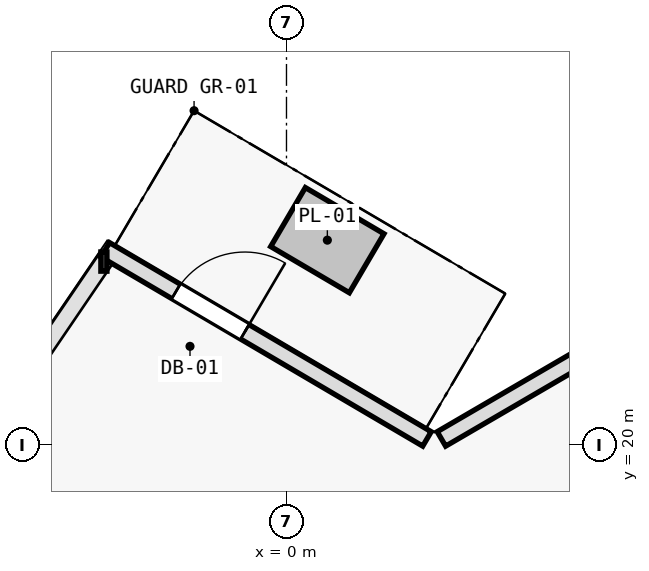
"""IFC4 building model, lengths in metres.
Left out: names, types, materials, properties, quantities, classifications, styles, units other than length and angle.
Written with IfcOpenShell. Run it as: python <this file> out.ifc"""

import sys

from ifc_helpers import new_model, si_unit, direction, frame, frame_2d, origin, place, context, subcontext, project, spatial, rectangle, extrude, element, fill, save


model = new_model("IFC4")
c1 = context("Model", 3, precision=1e-05, world=origin(), true_north=direction((0.0, 1.0)))
c2 = subcontext(c1, "Body", "Model", "MODEL_VIEW")
j1 = project(units=[si_unit("LENGTHUNIT", "METRE"), si_unit("PLANEANGLEUNIT", "RADIAN")], contexts=[c1])
p1 = place(None, origin())
s1 = spatial("IfcSite", under=j1, at=p1, CompositionType="ELEMENT")
p2 = place(p1, origin())
s2 = spatial("IfcBuilding", under=s1, at=p2, CompositionType="ELEMENT")
p3 = place(p2, frame((0.0, 0.0, 134.1)))
s3 = spatial("IfcBuildingStorey", under=s2, at=p3, CompositionType="ELEMENT", Elevation=134.1)
p4 = place(p3, frame((2.039, 20.079, 0.0), z_axis=(0.0, 0.0, 1.0), x_axis=(0.86398603623, 0.503515768571, 0.0)))
e1 = element("IfcWall", 1, at=p4, inside=s3, PredefinedType="SOLIDWALL", context=c2, shape_type="SweptSolid", body=[
    extrude(rectangle(XDim=4.444, YDim=0.22, at=frame_2d((2.222, 0.0))), origin(), (0.0, 0.0, 1.0), 4.25),
])
p5 = place(p3, frame((-2.385, 22.567, 0.0), z_axis=(0.0, 0.0, 1.0), x_axis=(0.8621258938, -0.506694131839, 0.0)))
e2 = element("IfcWall", 2, at=p5, inside=s3, PredefinedType="SOLIDWALL", context=c2, shape_type="SweptSolid", body=[
    extrude(rectangle(XDim=4.91, YDim=0.22, at=frame_2d((2.455, 0.0))), origin(), (0.0, 0.0, 1.0), 4.25),
])
p6 = place(p5, frame((1.08, 0.0, 0.0)))
e3 = element("IfcOpeningElement", 3, at=p6, cuts=e2, PredefinedType="OPENING", context=c2, shape_type="SweptSolid", body=[
    extrude(rectangle(XDim=1.05, YDim=2.15, at=frame_2d((0.525, 1.075))), frame((0.0, 0.12, 0.0), z_axis=(0.0, -1.0, 0.0), x_axis=(1.0, 0.0, 0.0)), (0.0, 0.0, 1.0), 0.24),
])
p7 = place(p6, origin())
e4 = element("IfcDoor", 4, at=p7, inside=s3, OperationType="SINGLE_SWING_RIGHT", PredefinedType="DOOR", context=c2, shape_type="SweptSolid", body=[
    extrude(rectangle(XDim=1.05, YDim=2.15, at=frame_2d((0.525, 1.075))), frame((0.0, 0.025, 0.0), z_axis=(0.0, -1.0, 0.0), x_axis=(1.0, 0.0, 0.0)), (0.0, 0.0, 1.0), 0.05),
])
fill(e3, e4)
save(model, sys.argv[1])
